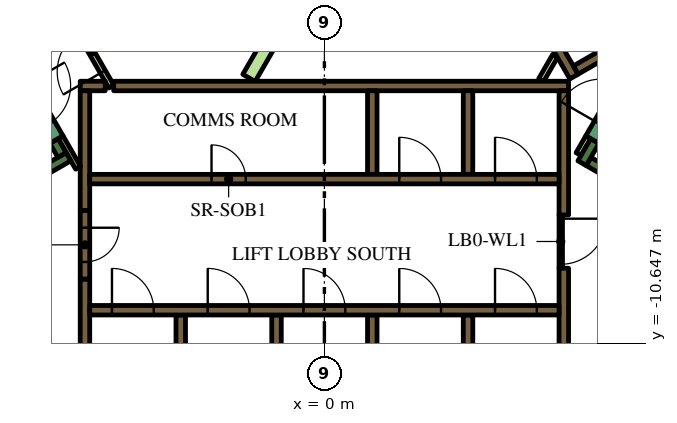
"""IFC4 building model, lengths in metres.
Left out: names, types, materials, properties, quantities, classifications, styles, units other than length and angle.
Written with IfcOpenShell. Run it as: python <this file> out.ifc"""

import sys

from ifc_helpers import new_model, si_unit, direction, frame, frame_2d, origin, place, context, subcontext, project, spatial, polyline, rectangle, outline, extrude, element, fill, save


model = new_model("IFC4")
c1 = context("Model", 3, precision=1e-05, world=origin(), true_north=direction((0.0, 1.0)))
c2 = subcontext(c1, "Body", "Model", "MODEL_VIEW")
j1 = project(units=[si_unit("LENGTHUNIT", "METRE"), si_unit("PLANEANGLEUNIT", "RADIAN")], contexts=[c1])
p1 = place(None, origin())
s1 = spatial("IfcSite", under=j1, at=p1, CompositionType="ELEMENT")
p2 = place(p1, origin())
s2 = spatial("IfcBuilding", under=s1, at=p2, CompositionType="ELEMENT")
p3 = place(p2, frame((0.0, 0.0, 107.1)))
s3 = spatial("IfcBuildingStorey", under=s2, at=p3, CompositionType="ELEMENT", Elevation=107.1)
p4 = place(p3, frame((6.711, 13.476, 0.0), z_axis=(0.0, 0.0, 1.0), x_axis=(0.500002723396, -0.866023831425, 0.0)))
e1 = element("IfcWall", 1, at=p4, inside=s3, PredefinedType="SOLIDWALL", context=c2, shape_type="SweptSolid", body=[
    extrude(rectangle(XDim=20.334, YDim=0.9, at=frame_2d((10.167, 0.0))), origin(), (0.0, 0.0, 1.0), 3.9),
])
p5 = place(p3, frame((12.84, -9.261, 0.0), z_axis=(0.0, 0.0, 1.0), x_axis=(-0.866013990052, 0.500019768644, 0.0)))
e2 = element("IfcWall", 2, at=p5, inside=s3, PredefinedType="SOLIDWALL", context=c2, shape_type="SweptSolid", body=[
    extrude(rectangle(XDim=6.8, YDim=0.25, at=frame_2d((3.4, 0.0))), origin(), (0.0, 0.0, 1.0), 3.9),
])
p6 = place(p3, frame((6.78, -5.906, 0.0), z_axis=(0.0, 0.0, 1.0), x_axis=(0.500223362819, 0.865896406789, 0.0)))
e3 = element("IfcWall", 3, at=p6, inside=s3, PredefinedType="SOLIDWALL", context=c2, shape_type="SweptSolid", body=[
    extrude(rectangle(XDim=0.675, YDim=0.25, at=frame_2d((0.337, 0.0))), origin(), (0.0, 0.0, 1.0), 3.9),
])
p7 = place(p3, frame((-12.84, -9.261, 0.0), z_axis=(0.0, 0.0, 1.0), x_axis=(0.866016039709, 0.500016218704, 0.0)))
e4 = element("IfcWall", 4, at=p7, inside=s3, PredefinedType="SOLIDWALL", context=c2, shape_type="SweptSolid", body=[
    extrude(rectangle(XDim=7.05, YDim=0.25, at=frame_2d((3.525, 0.0))), origin(), (0.0, 0.0, 1.0), 3.9),
])
p8 = place(p3, frame((-6.905, -5.69, 0.0), z_axis=(0.0, 0.0, 1.0), x_axis=(-0.500402024738, 0.865793170242, 0.0)))
e5 = element("IfcWall", 5, at=p8, inside=s3, PredefinedType="SOLIDWALL", context=c2, shape_type="SweptSolid", body=[
    extrude(rectangle(XDim=0.425, YDim=0.25, at=frame_2d((0.212, 0.0))), origin(), (0.0, 0.0, 1.0), 3.9),
])
p9 = place(p3, frame((-3.78, -12.1, 0.0), z_axis=(0.0, 0.0, 1.0), x_axis=(0.0, 1.0, 0.0)))
e6 = element("IfcWall", 6, at=p9, inside=s3, PredefinedType="SOLIDWALL", context=c2, shape_type="SweptSolid", body=[
    extrude(rectangle(XDim=2.2, YDim=0.25, at=frame_2d((1.1, 0.0))), origin(), (0.0, 0.0, 1.0), 3.9),
])
p10 = place(p3, frame((-6.3, -12.1, 0.0), z_axis=(0.0, 0.0, 1.0), x_axis=(0.0, 1.0, 0.0)))
e7 = element("IfcWall", 7, at=p10, inside=s3, PredefinedType="SOLIDWALL", context=c2, shape_type="SweptSolid", body=[
    extrude(rectangle(XDim=3.146, YDim=0.25, at=frame_2d((1.573, 0.0))), origin(), (0.0, 0.0, 1.0), 3.9),
])
p11 = place(p3, frame((-5.545, -3.875, 0.0), z_axis=(0.0, 0.0, 1.0), x_axis=(1.0, 0.0, 0.0)))
e8 = element("IfcWall", 8, at=p11, inside=s3, PredefinedType="SOLIDWALL", context=c2, shape_type="SweptSolid", body=[
    extrude(rectangle(XDim=11.97, YDim=0.25, at=frame_2d((5.985, 0.0))), origin(), (0.0, 0.0, 1.0), 3.9),
])
p12 = place(p3, frame((-6.425, -3.875, 0.0), z_axis=(0.0, 0.0, 1.0), x_axis=(1.0, 0.0, 0.0)))
e9 = element("IfcWall", 9, at=p12, inside=s3, PredefinedType="SOLIDWALL", context=c2, shape_type="SweptSolid", body=[
    extrude(rectangle(XDim=0.658, YDim=0.25, at=frame_2d((0.329, 0.0))), origin(), (0.0, 0.0, 1.0), 3.9),
])
p13 = place(p3, frame((6.3, -8.67, 0.0), z_axis=(0.0, 0.0, 1.0), x_axis=(0.0, -1.0, 0.0)))
e10 = element("IfcWall", 10, at=p13, inside=s3, PredefinedType="SOLIDWALL", context=c2, shape_type="SweptSolid", body=[
    extrude(rectangle(XDim=3.43, YDim=0.25, at=frame_2d((1.715, 0.0))), origin(), (0.0, 0.0, 1.0), 3.9),
])
p14 = place(p3, frame((6.3, -7.268, 0.0), z_axis=(0.0, 0.0, 1.0), x_axis=(0.0, 1.0, 0.0)))
e11 = element("IfcWall", 11, at=p14, inside=s3, PredefinedType="SOLIDWALL", context=c2, shape_type="SweptSolid", body=[
    extrude(rectangle(XDim=3.268, YDim=0.25, at=frame_2d((1.634, 0.0))), origin(), (0.0, 0.0, 1.0), 3.9),
])
for number, where, z_axis, x_axis in (
    (12, (3.78, -4.0, 0.0), (0.0, 0.0, 1.0), (0.0, -1.0, 0.0)),
    (13, (1.26, -4.0, 0.0), (0.0, 0.0, 1.0), (0.0, -1.0, 0.0)),
):
    element("IfcWall", number, at=place(p3, frame(where, z_axis=z_axis, x_axis=x_axis)), inside=s3, PredefinedType="SOLIDWALL", context=c2, shape_type="SweptSolid", body=[
        extrude(rectangle(XDim=2.2, YDim=0.25, at=frame_2d((1.1, 0.0))), origin(), (0.0, 0.0, 1.0), 3.9),
    ])
p15 = place(p3, frame((-6.3, -4.0, 0.0), z_axis=(0.0, 0.0, 1.0), x_axis=(0.0, -1.0, 0.0)))
e14 = element("IfcWall", 14, at=p15, inside=s3, PredefinedType="SOLIDWALL", context=c2, shape_type="SweptSolid", body=[
    extrude(rectangle(XDim=3.154, YDim=0.25, at=frame_2d((1.577, 0.0))), origin(), (0.0, 0.0, 1.0), 3.9),
])
for number, where, z_axis, x_axis in (
    (15, (3.78, -12.1, 0.0), (0.0, 0.0, 1.0), (0.0, 1.0, 0.0)),
    (16, (1.26, -12.1, 0.0), (0.0, 0.0, 1.0), (0.0, 1.0, 0.0)),
    (17, (-1.26, -12.1, 0.0), (0.0, 0.0, 1.0), (0.0, 1.0, 0.0)),
):
    element("IfcWall", number, at=place(p3, frame(where, z_axis=z_axis, x_axis=x_axis)), inside=s3, PredefinedType="SOLIDWALL", context=c2, shape_type="SweptSolid", body=[
        extrude(rectangle(XDim=2.2, YDim=0.25, at=frame_2d((1.1, 0.0))), origin(), (0.0, 0.0, 1.0), 3.9),
    ])
p16 = place(p3, origin())
e18 = element("IfcWall", 18, at=p16, inside=s3, PredefinedType="SOLIDWALL", context=c2, shape_type="SweptSolid", body=[
    extrude(outline(polyline([(0.566, 6.725), (0.566, 6.875), (0.566, 6.875), (0.565, 6.875), (0.361, 6.875), (0.035, 7.439), (0.252, 7.564), (0.377, 7.348), (6.552, -3.348), (6.677, -3.564), (6.46, -3.689), (0.448, 6.725), (0.565, 6.725), (0.566, 6.725), (0.566, 6.725)])), origin(), (0.0, 0.0, 1.0), 3.9),
])
p17 = place(p3, frame((6.614, -3.456, 0.0), z_axis=(0.0, 0.0, 1.0), x_axis=(0.86602447079, 0.500001615989, 0.0)))
e19 = element("IfcWall", 19, at=p17, inside=s3, PredefinedType="SOLIDWALL", context=c2, shape_type="SweptSolid", body=[
    extrude(rectangle(XDim=3.154, YDim=0.25, at=frame_2d((1.577, 0.0))), origin(), (0.0, 0.0, 1.0), 3.9),
])
p18 = place(p3, frame((-6.48, -6.027, 0.0), z_axis=(0.0, 0.0, 1.0), x_axis=(-0.499927229454, 0.866067413802, 0.0)))
e20 = element("IfcWall", 20, at=p18, inside=s3, PredefinedType="PARTITIONING", context=c2, shape_type="SweptSolid", body=[
    extrude(rectangle(XDim=0.929, YDim=0.15, at=frame_2d((0.464, 0.0))), origin(), (0.0, 0.0, 1.0), 3.9),
])
p19 = place(p3, frame((6.945, -5.222, 0.0), z_axis=(0.0, 0.0, 1.0), x_axis=(-0.499818422106, -0.866130212453, 0.0)))
e21 = element("IfcWall", 21, at=p19, inside=s3, PredefinedType="PARTITIONING", context=c2, shape_type="SweptSolid", body=[
    extrude(rectangle(XDim=0.514, YDim=0.15, at=frame_2d((0.257, 0.0))), origin(), (0.0, 0.0, 1.0), 2.75),
])
p20 = place(p3, frame((5.705, -3.718, 0.0), z_axis=(0.0, 0.0, 1.0), x_axis=(0.499962090823, 0.866047289552, 0.0)))
e22 = element("IfcWall", 22, at=p20, inside=s3, PredefinedType="PARTITIONING", context=c2, shape_type="SweptSolid", body=[
    extrude(rectangle(XDim=0.735, YDim=0.15, at=frame_2d((0.367, 0.0))), origin(), (0.0, 0.0, 1.0), 2.75),
])
e23 = element("IfcWall", 23, at=p16, inside=s3, PredefinedType="PARTITIONING", context=c2, shape_type="SweptSolid", body=[
    extrude(outline(polyline([(-0.59, -0.872), (-0.265, -1.059), (-1.822, -3.756), (-2.147, -3.568), (-0.59, -0.872)])), origin(), (0.0, 0.0, 1.0), 2.75),
])
p21 = place(p3, frame((-6.175, -9.775, 0.0), z_axis=(0.0, 0.0, 1.0), x_axis=(1.0, 0.0, 0.0)))
e24 = element("IfcWall", 24, at=p21, inside=s3, PredefinedType="SOLIDWALL", context=c2, shape_type="SweptSolid", body=[
    extrude(rectangle(XDim=12.35, YDim=0.25, at=frame_2d((6.175, 0.0))), origin(), (0.0, 0.0, 1.0), 3.9),
])
p22 = place(p21, frame((0.585, 0.0, 0.0)))
e25 = element("IfcOpeningElement", 25, at=p22, cuts=e24, PredefinedType="OPENING", context=c2, shape_type="SweptSolid", body=[
    extrude(rectangle(XDim=1.1, YDim=2.1, at=frame_2d((0.55, 1.05))), frame((0.0, 0.135, 0.0), z_axis=(0.0, -1.0, 0.0), x_axis=(1.0, 0.0, 0.0)), (0.0, 0.0, 1.0), 0.27),
])
p23 = place(p21, frame((3.105, 0.0, 0.0)))
e26 = element("IfcOpeningElement", 26, at=p23, cuts=e24, PredefinedType="OPENING", context=c2, shape_type="SweptSolid", body=[
    extrude(rectangle(XDim=1.1, YDim=2.1, at=frame_2d((0.55, 1.05))), frame((0.0, 0.135, 0.0), z_axis=(0.0, -1.0, 0.0), x_axis=(1.0, 0.0, 0.0)), (0.0, 0.0, 1.0), 0.27),
])
p24 = place(p21, frame((5.625, 0.0, 0.0)))
e27 = element("IfcOpeningElement", 27, at=p24, cuts=e24, PredefinedType="OPENING", context=c2, shape_type="SweptSolid", body=[
    extrude(rectangle(XDim=1.1, YDim=2.1, at=frame_2d((0.55, 1.05))), frame((0.0, 0.135, 0.0), z_axis=(0.0, -1.0, 0.0), x_axis=(1.0, 0.0, 0.0)), (0.0, 0.0, 1.0), 0.27),
])
p25 = place(p21, frame((8.145, 0.0, 0.0)))
e28 = element("IfcOpeningElement", 28, at=p25, cuts=e24, PredefinedType="OPENING", context=c2, shape_type="SweptSolid", body=[
    extrude(rectangle(XDim=1.1, YDim=2.1, at=frame_2d((0.55, 1.05))), frame((0.0, 0.135, 0.0), z_axis=(0.0, -1.0, 0.0), x_axis=(1.0, 0.0, 0.0)), (0.0, 0.0, 1.0), 0.27),
])
p26 = place(p21, frame((10.665, 0.0, 0.0)))
e29 = element("IfcOpeningElement", 29, at=p26, cuts=e24, PredefinedType="OPENING", context=c2, shape_type="SweptSolid", body=[
    extrude(rectangle(XDim=1.1, YDim=2.1, at=frame_2d((0.55, 1.05))), frame((0.0, 0.135, 0.0), z_axis=(0.0, -1.0, 0.0), x_axis=(1.0, 0.0, 0.0)), (0.0, 0.0, 1.0), 0.27),
])
p27 = place(p3, frame((-6.175, -6.325, 0.0), z_axis=(0.0, 0.0, 1.0), x_axis=(1.0, 0.0, 0.0)))
e30 = element("IfcWall", 30, at=p27, inside=s3, PredefinedType="SOLIDWALL", context=c2, shape_type="SweptSolid", body=[
    extrude(rectangle(XDim=12.35, YDim=0.25, at=frame_2d((6.175, 0.0))), origin(), (0.0, 0.0, 1.0), 3.9),
])
p28 = place(p27, frame((3.205, 0.0, 0.0)))
e31 = element("IfcOpeningElement", 31, at=p28, cuts=e30, PredefinedType="OPENING", context=c2, shape_type="SweptSolid", body=[
    extrude(rectangle(XDim=0.9, YDim=2.1, at=frame_2d((0.45, 1.05))), frame((0.0, 0.135, 0.0), z_axis=(0.0, -1.0, 0.0), x_axis=(1.0, 0.0, 0.0)), (0.0, 0.0, 1.0), 0.27),
])
p29 = place(p27, frame((8.145, 0.0, 0.0)))
e32 = element("IfcOpeningElement", 32, at=p29, cuts=e30, PredefinedType="OPENING", context=c2, shape_type="SweptSolid", body=[
    extrude(rectangle(XDim=1.1, YDim=2.1, at=frame_2d((0.55, 1.05))), frame((0.0, 0.135, 0.0), z_axis=(0.0, -1.0, 0.0), x_axis=(1.0, 0.0, 0.0)), (0.0, 0.0, 1.0), 0.27),
])
p30 = place(p27, frame((10.665, 0.0, 0.0)))
e33 = element("IfcOpeningElement", 33, at=p30, cuts=e30, PredefinedType="OPENING", context=c2, shape_type="SweptSolid", body=[
    extrude(rectangle(XDim=1.1, YDim=2.1, at=frame_2d((0.55, 1.05))), frame((0.0, 0.135, 0.0), z_axis=(0.0, -1.0, 0.0), x_axis=(1.0, 0.0, 0.0)), (0.0, 0.0, 1.0), 0.27),
])
p31 = place(p3, frame((7.053, -5.284, 0.0), z_axis=(0.0, 0.0, 1.0), x_axis=(0.500078061341, 0.865980330357, 0.0)))
e34 = element("IfcWall", 34, at=p31, inside=s3, PredefinedType="SOLIDWALL", context=c2, shape_type="SweptSolid", body=[
    extrude(rectangle(XDim=2.1, YDim=0.4, at=frame_2d((1.05, 0.0))), origin(), (0.0, 0.0, 1.0), 3.9),
])
p32 = place(p31, frame((0.45, 0.0, 0.0)))
e35 = element("IfcOpeningElement", 35, at=p32, cuts=e34, PredefinedType="OPENING", context=c2, shape_type="SweptSolid", body=[
    extrude(rectangle(XDim=1.2, YDim=2.1, at=frame_2d((0.6, 1.05))), frame((0.0, 0.21, 0.0), z_axis=(0.0, -1.0, 0.0), x_axis=(1.0, 0.0, 0.0)), (0.0, 0.0, 1.0), 0.42),
])
p33 = place(p3, frame((-8.103, -3.466, 0.0), z_axis=(0.0, 0.0, 1.0), x_axis=(0.500078061341, -0.865980330357, 0.0)))
e36 = element("IfcWall", 36, at=p33, inside=s3, PredefinedType="SOLIDWALL", context=c2, shape_type="SweptSolid", body=[
    extrude(rectangle(XDim=2.1, YDim=0.4, at=frame_2d((1.05, 0.0))), origin(), (0.0, 0.0, 1.0), 3.9),
])
p34 = place(p33, frame((0.45, 0.0, 0.0)))
e37 = element("IfcOpeningElement", 37, at=p34, cuts=e36, PredefinedType="OPENING", context=c2, shape_type="SweptSolid", body=[
    extrude(rectangle(XDim=1.2, YDim=2.1, at=frame_2d((0.6, 1.05))), frame((0.0, 0.21, 0.0), z_axis=(0.0, -1.0, 0.0), x_axis=(1.0, 0.0, 0.0)), (0.0, 0.0, 1.0), 0.42),
])
p35 = place(p3, frame((-6.3, -7.154, 0.0), z_axis=(0.0, 0.0, 1.0), x_axis=(0.0, -1.0, 0.0)))
e38 = element("IfcWall", 38, at=p35, inside=s3, PredefinedType="SOLIDWALL", context=c2, shape_type="SweptSolid", body=[
    extrude(rectangle(XDim=1.8, YDim=0.25, at=frame_2d((0.9, 0.0))), origin(), (0.0, 0.0, 1.0), 3.9),
])
p36 = place(p35, frame((0.45, 0.0, 0.0)))
e39 = element("IfcOpeningElement", 39, at=p36, cuts=e38, PredefinedType="OPENING", context=c2, shape_type="SweptSolid", body=[
    extrude(rectangle(XDim=0.9, YDim=2.1, at=frame_2d((0.45, 1.05))), frame((0.0, 0.135, 0.0), z_axis=(0.0, -1.0, 0.0), x_axis=(1.0, 0.0, 0.0)), (0.0, 0.0, 1.0), 0.27),
])
p37 = place(p3, frame((-5.606, -3.89, 0.0), z_axis=(0.0, 0.0, 1.0), x_axis=(-0.500027713859, 0.866009402589, 0.0)))
e40 = element("IfcWall", 40, at=p37, inside=s3, PredefinedType="PARTITIONING", context=c2, shape_type="SweptSolid", body=[
    extrude(rectangle(XDim=2.1, YDim=0.15, at=frame_2d((1.05, 0.0))), origin(), (0.0, 0.0, 1.0), 2.75),
])
p38 = place(p37, frame((0.45, 0.0, 0.0)))
e41 = element("IfcOpeningElement", 41, at=p38, cuts=e40, PredefinedType="OPENING", context=c2, shape_type="SweptSolid", body=[
    extrude(rectangle(XDim=1.2, YDim=2.1, at=frame_2d((0.6, 1.05))), frame((0.0, 0.085, 0.0), z_axis=(0.0, -1.0, 0.0), x_axis=(1.0, 0.0, 0.0)), (0.0, 0.0, 1.0), 0.17),
])
p39 = place(p3, frame((6.22, -7.266, 0.0), z_axis=(0.0, 0.0, 1.0), x_axis=(0.0, -1.0, 0.0)))
e42 = element("IfcWall", 42, at=p39, inside=s3, PredefinedType="PARTITIONING", context=c2, shape_type="SweptSolid", body=[
    extrude(rectangle(XDim=1.4, YDim=0.09, at=frame_2d((0.7, 0.0))), origin(), (0.0, 0.0, 1.0), 2.75),
])
p40 = place(p39, frame((0.1, 0.0, 0.0)))
e43 = element("IfcOpeningElement", 43, at=p40, cuts=e42, PredefinedType="OPENING", context=c2, shape_type="SweptSolid", body=[
    extrude(rectangle(XDim=1.2, YDim=2.1, at=frame_2d((0.6, 1.05))), frame((0.0, 0.055, 0.0), z_axis=(0.0, -1.0, 0.0), x_axis=(1.0, 0.0, 0.0)), (0.0, 0.0, 1.0), 0.11),
])
p41 = place(p3, frame((6.163, 18.475, 0.0), z_axis=(0.0, 0.0, 1.0), x_axis=(0.500001317485, -0.866024643133, 0.0)))
e44 = element("IfcWall", 44, at=p41, inside=s3, PredefinedType="PARTITIONING", context=c2, shape_type="SweptSolid", body=[
    extrude(rectangle(XDim=25.767, YDim=0.15, at=frame_2d((12.883, 0.0))), origin(), (0.0, 0.0, 1.0), 2.75),
])
p42 = place(p41, frame((24.241, 0.0, 0.0)))
e45 = element("IfcOpeningElement", 45, at=p42, cuts=e44, PredefinedType="OPENING", context=c2, shape_type="SweptSolid", body=[
    extrude(rectangle(XDim=1.0, YDim=2.1, at=frame_2d((0.5, 1.05))), frame((0.0, 0.085, 0.0), z_axis=(0.0, -1.0, 0.0), x_axis=(1.0, 0.0, 0.0)), (0.0, 0.0, 1.0), 0.17),
])
p43 = place(p41, frame((13.144, 0.0, 0.0)))
e46 = element("IfcOpeningElement", 46, at=p43, cuts=e44, PredefinedType="OPENING", context=c2, shape_type="SweptSolid", body=[
    extrude(rectangle(XDim=1.0, YDim=2.1, at=frame_2d((0.5, 1.05))), frame((0.0, 0.085, 0.0), z_axis=(0.0, -1.0, 0.0), x_axis=(1.0, 0.0, 0.0)), (0.0, 0.0, 1.0), 0.17),
])
p44 = place(p41, frame((10.874, 0.0, 0.0)))
e47 = element("IfcOpeningElement", 47, at=p44, cuts=e44, PredefinedType="OPENING", context=c2, shape_type="SweptSolid", body=[
    extrude(rectangle(XDim=0.9, YDim=2.1, at=frame_2d((0.45, 1.05))), frame((0.0, 0.085, 0.0), z_axis=(0.0, -1.0, 0.0), x_axis=(1.0, 0.0, 0.0)), (0.0, 0.0, 1.0), 0.17),
])
p45 = place(p41, frame((3.718, 0.0, 0.0)))
e48 = element("IfcOpeningElement", 48, at=p45, cuts=e44, PredefinedType="OPENING", context=c2, shape_type="SweptSolid", body=[
    extrude(rectangle(XDim=1.0, YDim=2.1, at=frame_2d((0.5, 1.05))), frame((0.0, 0.085, 0.0), z_axis=(0.0, -1.0, 0.0), x_axis=(1.0, 0.0, 0.0)), (0.0, 0.0, 1.0), 0.17),
])
p46 = place(p41, frame((2.411, 0.0, 0.0)))
e49 = element("IfcOpeningElement", 49, at=p46, cuts=e44, PredefinedType="OPENING", context=c2, shape_type="SweptSolid", body=[
    extrude(rectangle(XDim=1.0, YDim=2.1, at=frame_2d((0.5, 1.05))), frame((0.0, 0.085, 0.0), z_axis=(0.0, -1.0, 0.0), x_axis=(1.0, 0.0, 0.0)), (0.0, 0.0, 1.0), 0.17),
])
p47 = place(p3, frame((-19.081, -3.9, 0.0), z_axis=(0.0, 0.0, 1.0), x_axis=(0.499998313975, 0.866026377209, 0.0)))
e50 = element("IfcWall", 50, at=p47, inside=s3, PredefinedType="PARTITIONING", context=c2, shape_type="SweptSolid", body=[
    extrude(rectangle(XDim=25.766, YDim=0.15, at=frame_2d((12.883, 0.0))), origin(), (0.0, 0.0, 1.0), 2.75),
])
p48 = place(p47, frame((19.306, 0.0, 0.0)))
e51 = element("IfcOpeningElement", 51, at=p48, cuts=e50, PredefinedType="OPENING", context=c2, shape_type="SweptSolid", body=[
    extrude(rectangle(XDim=1.0, YDim=2.1, at=frame_2d((0.5, 1.05))), frame((0.0, 0.085, 0.0), z_axis=(0.0, -1.0, 0.0), x_axis=(1.0, 0.0, 0.0)), (0.0, 0.0, 1.0), 0.17),
])
p49 = place(p47, frame((18.0, 0.0, 0.0)))
e52 = element("IfcOpeningElement", 52, at=p49, cuts=e50, PredefinedType="OPENING", context=c2, shape_type="SweptSolid", body=[
    extrude(rectangle(XDim=1.0, YDim=2.1, at=frame_2d((0.5, 1.05))), frame((0.0, 0.085, 0.0), z_axis=(0.0, -1.0, 0.0), x_axis=(1.0, 0.0, 0.0)), (0.0, 0.0, 1.0), 0.17),
])
p50 = place(p47, frame((6.838, 0.0, 0.0)))
e53 = element("IfcOpeningElement", 53, at=p50, cuts=e50, PredefinedType="OPENING", context=c2, shape_type="SweptSolid", body=[
    extrude(rectangle(XDim=1.0, YDim=2.1, at=frame_2d((0.5, 1.05))), frame((0.0, 0.085, 0.0), z_axis=(0.0, -1.0, 0.0), x_axis=(1.0, 0.0, 0.0)), (0.0, 0.0, 1.0), 0.17),
])
p51 = place(p47, frame((4.674, 0.0, 0.0)))
e54 = element("IfcOpeningElement", 54, at=p51, cuts=e50, PredefinedType="OPENING", context=c2, shape_type="SweptSolid", body=[
    extrude(rectangle(XDim=0.9, YDim=2.1, at=frame_2d((0.45, 1.05))), frame((0.0, 0.085, 0.0), z_axis=(0.0, -1.0, 0.0), x_axis=(1.0, 0.0, 0.0)), (0.0, 0.0, 1.0), 0.17),
])
p52 = place(p47, frame((0.18, 0.0, 0.0)))
e55 = element("IfcOpeningElement", 55, at=p52, cuts=e50, PredefinedType="OPENING", context=c2, shape_type="SweptSolid", body=[
    extrude(rectangle(XDim=1.0, YDim=2.1, at=frame_2d((0.5, 1.05))), frame((0.0, 0.085, 0.0), z_axis=(0.0, -1.0, 0.0), x_axis=(1.0, 0.0, 0.0)), (0.0, 0.0, 1.0), 0.17),
])
p53 = place(p22, origin())
e56 = element("IfcDoor", 56, at=p53, inside=s3, OperationType="DOUBLE_DOOR_SLIDING", PredefinedType="DOOR", context=c2, shape_type="SweptSolid", body=[
    extrude(rectangle(XDim=1.1, YDim=2.1, at=frame_2d((0.55, 1.05))), frame((0.0, 0.025, 0.0), z_axis=(0.0, -1.0, 0.0), x_axis=(1.0, 0.0, 0.0)), (0.0, 0.0, 1.0), 0.05),
])
fill(e25, e56)
p54 = place(p23, origin())
e57 = element("IfcDoor", 57, at=p54, inside=s3, OperationType="DOUBLE_DOOR_SLIDING", PredefinedType="DOOR", context=c2, shape_type="SweptSolid", body=[
    extrude(rectangle(XDim=1.1, YDim=2.1, at=frame_2d((0.55, 1.05))), frame((0.0, 0.025, 0.0), z_axis=(0.0, -1.0, 0.0), x_axis=(1.0, 0.0, 0.0)), (0.0, 0.0, 1.0), 0.05),
])
fill(e26, e57)
p55 = place(p24, origin())
e58 = element("IfcDoor", 58, at=p55, inside=s3, OperationType="DOUBLE_DOOR_SLIDING", PredefinedType="DOOR", context=c2, shape_type="SweptSolid", body=[
    extrude(rectangle(XDim=1.1, YDim=2.1, at=frame_2d((0.55, 1.05))), frame((0.0, 0.025, 0.0), z_axis=(0.0, -1.0, 0.0), x_axis=(1.0, 0.0, 0.0)), (0.0, 0.0, 1.0), 0.05),
])
fill(e27, e58)
p56 = place(p25, origin())
e59 = element("IfcDoor", 59, at=p56, inside=s3, OperationType="DOUBLE_DOOR_SLIDING", PredefinedType="DOOR", context=c2, shape_type="SweptSolid", body=[
    extrude(rectangle(XDim=1.1, YDim=2.1, at=frame_2d((0.55, 1.05))), frame((0.0, 0.025, 0.0), z_axis=(0.0, -1.0, 0.0), x_axis=(1.0, 0.0, 0.0)), (0.0, 0.0, 1.0), 0.05),
])
fill(e28, e59)
p57 = place(p26, origin())
e60 = element("IfcDoor", 60, at=p57, inside=s3, OperationType="DOUBLE_DOOR_SLIDING", PredefinedType="DOOR", context=c2, shape_type="SweptSolid", body=[
    extrude(rectangle(XDim=1.1, YDim=2.1, at=frame_2d((0.55, 1.05))), frame((0.0, 0.025, 0.0), z_axis=(0.0, -1.0, 0.0), x_axis=(1.0, 0.0, 0.0)), (0.0, 0.0, 1.0), 0.05),
])
fill(e29, e60)
p58 = place(p28, origin())
e61 = element("IfcDoor", 61, at=p58, inside=s3, OperationType="SINGLE_SWING_LEFT", PredefinedType="DOOR", context=c2, shape_type="SweptSolid", body=[
    extrude(rectangle(XDim=0.9, YDim=2.1, at=frame_2d((0.45, 1.05))), frame((0.0, 0.025, 0.0), z_axis=(0.0, -1.0, 0.0), x_axis=(1.0, 0.0, 0.0)), (0.0, 0.0, 1.0), 0.05),
])
fill(e31, e61)
p59 = place(p29, origin())
e62 = element("IfcDoor", 62, at=p59, inside=s3, OperationType="DOUBLE_DOOR_SLIDING", PredefinedType="DOOR", context=c2, shape_type="SweptSolid", body=[
    extrude(rectangle(XDim=1.1, YDim=2.1, at=frame_2d((0.55, 1.05))), frame((0.0, 0.025, 0.0), z_axis=(0.0, -1.0, 0.0), x_axis=(1.0, 0.0, 0.0)), (0.0, 0.0, 1.0), 0.05),
])
fill(e32, e62)
p60 = place(p30, origin())
e63 = element("IfcDoor", 63, at=p60, inside=s3, OperationType="DOUBLE_DOOR_SLIDING", PredefinedType="DOOR", context=c2, shape_type="SweptSolid", body=[
    extrude(rectangle(XDim=1.1, YDim=2.1, at=frame_2d((0.55, 1.05))), frame((0.0, 0.025, 0.0), z_axis=(0.0, -1.0, 0.0), x_axis=(1.0, 0.0, 0.0)), (0.0, 0.0, 1.0), 0.05),
])
fill(e33, e63)
p61 = place(p36, origin())
e64 = element("IfcDoor", 64, at=p61, inside=s3, OperationType="SINGLE_SWING_LEFT", PredefinedType="DOOR", context=c2, shape_type="SweptSolid", body=[
    extrude(rectangle(XDim=0.9, YDim=2.1, at=frame_2d((0.45, 1.05))), frame((0.0, 0.025, 0.0), z_axis=(0.0, -1.0, 0.0), x_axis=(1.0, 0.0, 0.0)), (0.0, 0.0, 1.0), 0.05),
])
fill(e39, e64)
p62 = place(p38, origin())
e65 = element("IfcDoor", 65, at=p62, inside=s3, OperationType="SINGLE_SWING_LEFT", PredefinedType="DOOR", context=c2, shape_type="SweptSolid", body=[
    extrude(rectangle(XDim=1.2, YDim=2.1, at=frame_2d((0.6, 1.05))), frame((0.0, 0.025, 0.0), z_axis=(0.0, -1.0, 0.0), x_axis=(1.0, 0.0, 0.0)), (0.0, 0.0, 1.0), 0.05),
])
fill(e41, e65)
p63 = place(p40, origin())
e66 = element("IfcDoor", 66, at=p63, inside=s3, OperationType="SINGLE_SWING_LEFT", PredefinedType="DOOR", context=c2, shape_type="SweptSolid", body=[
    extrude(rectangle(XDim=1.2, YDim=2.1, at=frame_2d((0.6, 1.05))), frame((0.0, 0.025, 0.0), z_axis=(0.0, -1.0, 0.0), x_axis=(1.0, 0.0, 0.0)), (0.0, 0.0, 1.0), 0.05),
])
fill(e43, e66)
save(model, sys.argv[1])
